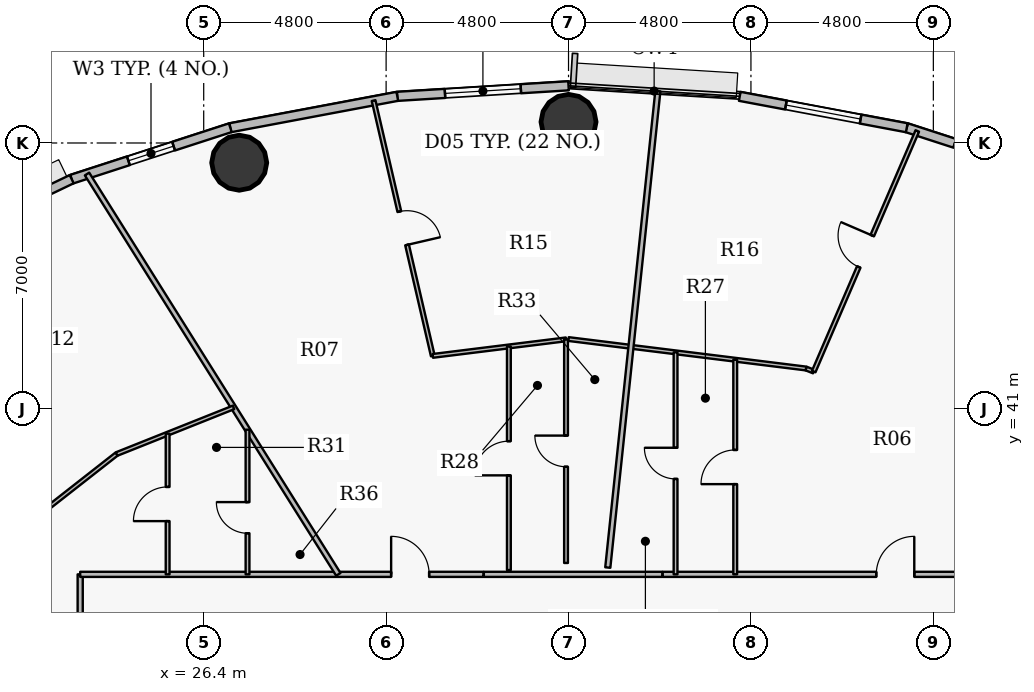
"""IFC4 building model, lengths in metres.
Left out: names, types, materials, properties, quantities, classifications, styles, units other than length and angle.
Written with IfcOpenShell. Run it as: python <this file> out.ifc"""

import sys

from ifc_helpers import new_model, si_unit, direction, frame, frame_2d, origin, origin_2d, place, context, subcontext, project, spatial, rectangle, hollow_circle, extrude, source, transform, mapped, element, fill, save


model = new_model("IFC4")
c1 = context("Model", 3, precision=1e-05, world=origin(), true_north=direction((0.0, 1.0)))
c2 = subcontext(c1, "Body", "Model", "MODEL_VIEW")
j1 = project(units=[si_unit("LENGTHUNIT", "METRE"), si_unit("PLANEANGLEUNIT", "RADIAN")], contexts=[c1])
p1 = place(None, origin())
s1 = spatial("IfcSite", under=j1, at=p1, CompositionType="ELEMENT")
p2 = place(p1, origin())
s2 = spatial("IfcBuilding", under=s1, at=p2, CompositionType="ELEMENT")
p3 = place(p2, frame((0.0, 0.0, 123.45)))
s3 = spatial("IfcBuildingStorey", under=s2, at=p3, CompositionType="ELEMENT", Elevation=123.45)
for number, where, z_axis, x_axis in (
    (1, (36.0, 48.555, 0.0), (0.0, 0.0, 1.0), (1.0, 0.0, 0.0)),
    (2, (27.334, 47.481, 0.0), (0.0, 0.0, 1.0), (1.0, 0.0, 0.0)),
):
    element("IfcColumn", number, at=place(p3, frame(where, z_axis=z_axis, x_axis=x_axis)), inside=s3, PredefinedType="COLUMN", context=c2, shape_type="SweptSolid", body=[
        extrude(hollow_circle(Radius=0.725, WallThickness=0.042, at=origin_2d()), origin(), (0.0, 0.0, 1.0), 3.75),
    ])
p4 = place(p3, frame((44.9, 48.401, 0.0), z_axis=(0.0, 0.0, 1.0), x_axis=(0.951211346073, -0.308540070495, 0.0)))
e3 = element("IfcWall", 3, at=p4, inside=s3, PredefinedType="SOLIDWALL", context=c2, shape_type="SweptSolid", body=[
    extrude(rectangle(XDim=4.388, YDim=0.24, at=frame_2d((2.194, 0.0))), origin(), (0.0, 0.0, 1.0), 3.5),
])
p5 = place(p4, frame((1.329, 0.0, 0.9)))
e4 = element("IfcOpeningElement", 4, at=p5, cuts=e3, PredefinedType="OPENING", context=c2, shape_type="SweptSolid", body=[
    extrude(rectangle(XDim=2.0, YDim=1.75, at=origin_2d()), frame((1.0, 0.13, 0.875), z_axis=(0.0, -1.0, 0.0), x_axis=(1.0, 0.0, 0.0)), (0.0, 0.0, 1.0), 0.26),
])
p6 = place(p3, frame((40.506, 49.227, 0.0), z_axis=(0.0, 0.0, 1.0), x_axis=(0.982789252177, -0.184730305596, 0.0)))
e5 = element("IfcWall", 5, at=p6, inside=s3, PredefinedType="SOLIDWALL", context=c2, shape_type="SweptSolid", body=[
    extrude(rectangle(XDim=4.471, YDim=0.24, at=frame_2d((2.235, 0.0))), origin(), (0.0, 0.0, 1.0), 3.5),
])
p7 = place(p6, frame((1.236, 0.0, 0.9)))
e6 = element("IfcOpeningElement", 6, at=p7, cuts=e5, PredefinedType="OPENING", context=c2, shape_type="SweptSolid", body=[
    extrude(rectangle(XDim=2.0, YDim=1.75, at=origin_2d()), frame((1.0, 0.13, 0.875), z_axis=(0.0, -1.0, 0.0), x_axis=(1.0, 0.0, 0.0)), (0.0, 0.0, 1.0), 0.26),
])
p8 = place(p3, frame((31.494, 49.227, 0.0), z_axis=(0.0, 0.0, 1.0), x_axis=(0.998107531589, 0.061492726276, 0.0)))
e7 = element("IfcWall", 7, at=p8, inside=s3, PredefinedType="SOLIDWALL", context=c2, shape_type="SweptSolid", body=[
    extrude(rectangle(XDim=4.514, YDim=0.24, at=frame_2d((2.257, 0.0))), origin(), (0.0, 0.0, 1.0), 3.5),
])
p9 = place(p8, frame((1.257, 0.0, 0.9)))
e8 = element("IfcOpeningElement", 8, at=p9, cuts=e7, PredefinedType="OPENING", context=c2, shape_type="SweptSolid", body=[
    extrude(rectangle(XDim=2.0, YDim=1.75, at=origin_2d()), frame((1.0, 0.13, 0.875), z_axis=(0.0, -1.0, 0.0), x_axis=(1.0, 0.0, 0.0)), (0.0, 0.0, 1.0), 0.26),
])
p10 = place(p3, frame((27.1, 48.401, 0.0), z_axis=(0.0, 0.0, 1.0), x_axis=(0.982789252177, 0.184730305596, 0.0)))
e9 = element("IfcWall", 9, at=p10, inside=s3, PredefinedType="SOLIDWALL", context=c2, shape_type="SweptSolid", body=[
    extrude(rectangle(XDim=4.471, YDim=0.24, at=frame_2d((2.235, 0.0))), origin(), (0.0, 0.0, 1.0), 3.5),
])
p11 = place(p3, frame((22.926, 47.047, 0.0), z_axis=(0.0, 0.0, 1.0), x_axis=(0.951211346073, 0.308540070495, 0.0)))
e10 = element("IfcWall", 10, at=p11, inside=s3, PredefinedType="SOLIDWALL", context=c2, shape_type="SweptSolid", body=[
    extrude(rectangle(XDim=4.388, YDim=0.24, at=frame_2d((2.194, 0.0))), origin(), (0.0, 0.0, 1.0), 3.5),
])
p12 = place(p11, frame((1.569, 0.0, 0.9)))
e11 = element("IfcOpeningElement", 11, at=p12, cuts=e10, PredefinedType="OPENING", context=c2, shape_type="SweptSolid", body=[
    extrude(rectangle(XDim=1.25, YDim=1.65, at=origin_2d()), frame((0.625, 0.13, 0.825), z_axis=(0.0, -1.0, 0.0), x_axis=(1.0, 0.0, 0.0)), (0.0, 0.0, 1.0), 0.26),
])
p13 = place(p3, frame((19.075, 45.199, 0.0), z_axis=(0.0, 0.0, 1.0), x_axis=(0.901589935876, 0.432591709962, 0.0)))
e12 = element("IfcWall", 12, at=p13, inside=s3, PredefinedType="SOLIDWALL", context=c2, shape_type="SweptSolid", body=[
    extrude(rectangle(XDim=4.272, YDim=0.24, at=frame_2d((2.136, 0.0))), origin(), (0.0, 0.0, 1.0), 3.5),
])
p14 = place(p13, frame((1.136, 0.0, 0.9)))
e13 = element("IfcOpeningElement", 13, at=p14, cuts=e12, PredefinedType="OPENING", context=c2, shape_type="SweptSolid", body=[
    extrude(rectangle(XDim=2.0, YDim=1.75, at=origin_2d()), frame((1.0, 0.13, 0.875), z_axis=(0.0, -1.0, 0.0), x_axis=(1.0, 0.0, 0.0)), (0.0, 0.0, 1.0), 0.26),
])
p15 = place(p3, frame((9.91, 36.375, 0.0), z_axis=(0.0, 0.0, 1.0), x_axis=(0.941089213164, -0.338158384292, 0.0)))
e14 = element("IfcWall", 14, at=p15, inside=s3, PredefinedType="PARTITIONING", context=c2, shape_type="SweptSolid", body=[
    extrude(rectangle(XDim=14.069, YDim=0.135, at=frame_2d((7.035, 0.0))), origin(), (0.0, 0.0, 1.0), 2.935),
])
p16 = place(p3, frame((22.064, 38.214, 0.0), z_axis=(0.0, 0.0, 1.0), x_axis=(0.787364158956, 0.616488184146, 0.0)))
e15 = element("IfcWall", 15, at=p16, inside=s3, PredefinedType="PARTITIONING", context=c2, shape_type="SweptSolid", body=[
    extrude(rectangle(XDim=2.597, YDim=0.1, at=frame_2d((1.299, 0.0))), origin(), (0.0, 0.0, 1.0), 3.5),
])
p17 = place(p3, frame((23.15, 17.35, 0.0), z_axis=(0.0, 0.0, 1.0), x_axis=(0.0, 1.0, 0.0)))
e16 = element("IfcWall", 16, at=p17, inside=s3, PredefinedType="PARTITIONING", context=c2, shape_type="SweptSolid", body=[
    extrude(rectangle(XDim=19.3, YDim=0.135, at=frame_2d((9.65, 0.0))), origin(), (0.0, 0.0, 1.0), 2.935),
])
p18 = place(p17, frame((16.264, 0.0, 0.0)))
e17 = element("IfcOpeningElement", 17, at=p18, cuts=e16, PredefinedType="OPENING", context=c2, shape_type="SweptSolid", body=[
    extrude(rectangle(XDim=1.0, YDim=2.15, at=origin_2d()), frame((0.5, 0.078, 1.075), z_axis=(0.0, -1.0, 0.0), x_axis=(1.0, 0.0, 0.0)), (0.0, 0.0, 1.0), 0.155),
])
p19 = place(p17, frame((7.426, 0.0, 0.0)))
e18 = element("IfcOpeningElement", 18, at=p19, cuts=e16, PredefinedType="OPENING", context=c2, shape_type="SweptSolid", body=[
    extrude(rectangle(XDim=1.0, YDim=2.15, at=origin_2d()), frame((0.5, 0.078, 1.075), z_axis=(0.0, -1.0, 0.0), x_axis=(1.0, 0.0, 0.0)), (0.0, 0.0, 1.0), 0.155),
])
p20 = place(p3, frame((23.15, 36.65, 0.0), z_axis=(0.0, 0.0, 1.0), x_axis=(1.0, 0.0, 0.0)))
e19 = element("IfcWall", 19, at=p20, inside=s3, PredefinedType="PARTITIONING", context=c2, shape_type="SweptSolid", body=[
    extrude(rectangle(XDim=10.612, YDim=0.135, at=frame_2d((5.306, 0.0))), origin(), (0.0, 0.0, 1.0), 2.935),
])
p21 = place(p20, frame((8.182, 0.0, 0.0)))
e20 = element("IfcOpeningElement", 20, at=p21, cuts=e19, PredefinedType="OPENING", context=c2, shape_type="SweptSolid", body=[
    extrude(rectangle(XDim=1.0, YDim=2.15, at=origin_2d()), frame((0.5, 0.078, 1.075), z_axis=(0.0, -1.0, 0.0), x_axis=(1.0, 0.0, 0.0)), (0.0, 0.0, 1.0), 0.155),
])
p22 = place(p3, frame((23.33, 47.184, 0.0), z_axis=(0.0, 0.0, 1.0), x_axis=(0.531660079213, -0.846957826678, 0.0)))
e21 = element("IfcWall", 21, at=p22, inside=s3, PredefinedType="PARTITIONING", context=c2, shape_type="SweptSolid", body=[
    extrude(rectangle(XDim=12.437, YDim=0.135, at=frame_2d((6.219, 0.0))), origin(), (0.0, 0.0, 1.0), 2.935),
])
p23 = place(p3, frame((24.109, 39.816, 0.0), z_axis=(0.0, 0.0, 1.0), x_axis=(0.928811896505, 0.370551563092, 0.0)))
e22 = element("IfcWall", 22, at=p23, inside=s3, PredefinedType="PARTITIONING", context=c2, shape_type="SweptSolid", body=[
    extrude(rectangle(XDim=3.312, YDim=0.1, at=frame_2d((1.656, 0.0))), origin(), (0.0, 0.0, 1.0), 3.5),
])
p24 = place(p3, frame((25.451, 36.65, 0.0), z_axis=(0.0, 0.0, 1.0), x_axis=(0.0, 1.0, 0.0)))
e23 = element("IfcWall", 23, at=p24, inside=s3, PredefinedType="PARTITIONING", context=c2, shape_type="SweptSolid", body=[
    extrude(rectangle(XDim=3.701, YDim=0.1, at=frame_2d((1.851, 0.0))), origin(), (0.0, 0.0, 1.0), 3.5),
])
p25 = place(p24, frame((1.4, 0.0, 0.0)))
e24 = element("IfcOpeningElement", 24, at=p25, cuts=e23, PredefinedType="OPENING", context=c2, shape_type="SweptSolid", body=[
    extrude(rectangle(XDim=0.9, YDim=2.1, at=origin_2d()), frame((0.45, 0.06, 1.05), z_axis=(0.0, -1.0, 0.0), x_axis=(1.0, 0.0, 0.0)), (0.0, 0.0, 1.0), 0.12),
])
p26 = place(p3, frame((27.553, 36.65, 0.0), z_axis=(0.0, 0.0, 1.0), x_axis=(0.0, 1.0, 0.0)))
e25 = element("IfcWall", 25, at=p26, inside=s3, PredefinedType="PARTITIONING", context=c2, shape_type="SweptSolid", body=[
    extrude(rectangle(XDim=3.806, YDim=0.1, at=frame_2d((1.903, 0.0))), origin(), (0.0, 0.0, 1.0), 3.5),
])
p27 = place(p26, frame((1.081, 0.0, 0.0)))
e26 = element("IfcOpeningElement", 26, at=p27, cuts=e25, PredefinedType="OPENING", context=c2, shape_type="SweptSolid", body=[
    extrude(rectangle(XDim=0.82, YDim=2.1, at=origin_2d()), frame((0.41, 0.06, 1.05), z_axis=(0.0, -1.0, 0.0), x_axis=(1.0, 0.0, 0.0)), (0.0, 0.0, 1.0), 0.12),
])
p28 = place(p3, frame((30.87, 49.115, 0.0), z_axis=(0.0, 0.0, 1.0), x_axis=(0.225963524246, -0.97413576349, 0.0)))
e27 = element("IfcWall", 27, at=p28, inside=s3, PredefinedType="PARTITIONING", context=c2, shape_type="SweptSolid", body=[
    extrude(rectangle(XDim=6.895, YDim=0.1, at=frame_2d((3.448, 0.0))), origin(), (0.0, 0.0, 1.0), 2.935),
])
p29 = place(p28, frame((2.998, 0.0, 0.0)))
e28 = element("IfcOpeningElement", 28, at=p29, cuts=e27, PredefinedType="OPENING", context=c2, shape_type="SweptSolid", body=[
    extrude(rectangle(XDim=0.9, YDim=2.1, at=origin_2d()), frame((0.45, 0.06, 1.05), z_axis=(0.0, -1.0, 0.0), x_axis=(1.0, 0.0, 0.0)), (0.0, 0.0, 1.0), 0.12),
])
p30 = place(p3, frame((32.428, 42.398, 0.0), z_axis=(0.0, 0.0, 1.0), x_axis=(0.992389102891, 0.123141660146, 0.0)))
e29 = element("IfcWall", 29, at=p30, inside=s3, PredefinedType="PARTITIONING", context=c2, shape_type="SweptSolid", body=[
    extrude(rectangle(XDim=3.533, YDim=0.1, at=frame_2d((1.767, 0.0))), origin(), (0.0, 0.0, 1.0), 2.935),
])
p31 = place(p3, frame((34.43, 36.762, 0.0), z_axis=(0.0, 0.0, 1.0), x_axis=(0.0, 1.0, 0.0)))
e30 = element("IfcWall", 30, at=p31, inside=s3, PredefinedType="PARTITIONING", context=c2, shape_type="SweptSolid", body=[
    extrude(rectangle(XDim=5.884, YDim=0.1, at=frame_2d((2.942, 0.0))), origin(), (0.0, 0.0, 1.0), 3.085),
])
p32 = place(p31, frame((2.492, 0.0, 0.0)))
e31 = element("IfcOpeningElement", 31, at=p32, cuts=e30, PredefinedType="OPENING", context=c2, shape_type="SweptSolid", body=[
    extrude(rectangle(XDim=0.9, YDim=2.1, at=origin_2d()), frame((0.45, 0.06, 1.05), z_axis=(0.0, -1.0, 0.0), x_axis=(1.0, 0.0, 0.0)), (0.0, 0.0, 1.0), 0.12),
])
p33 = place(p3, frame((35.935, 36.949, 0.0), z_axis=(0.0, 0.0, 1.0), x_axis=(0.0, 1.0, 0.0)))
e32 = element("IfcWall", 32, at=p33, inside=s3, PredefinedType="PARTITIONING", context=c2, shape_type="SweptSolid", body=[
    extrude(rectangle(XDim=5.884, YDim=0.1, at=frame_2d((2.942, 0.0))), origin(), (0.0, 0.0, 1.0), 2.935),
])
p34 = place(p33, frame((2.532, 0.0, 0.0)))
e33 = element("IfcOpeningElement", 33, at=p34, cuts=e32, PredefinedType="OPENING", context=c2, shape_type="SweptSolid", body=[
    extrude(rectangle(XDim=0.82, YDim=2.1, at=origin_2d()), frame((0.41, 0.06, 1.05), z_axis=(0.0, -1.0, 0.0), x_axis=(1.0, 0.0, 0.0)), (0.0, 0.0, 1.0), 0.12),
])
p35 = place(p3, frame((36.0, 42.841, 0.0), z_axis=(0.0, 0.0, 1.0), x_axis=(0.992395485088, -0.123090215599, 0.0)))
e34 = element("IfcWall", 34, at=p35, inside=s3, PredefinedType="PARTITIONING", context=c2, shape_type="SweptSolid", body=[
    extrude(rectangle(XDim=6.299, YDim=0.1, at=frame_2d((3.15, 0.0))), origin(), (0.0, 0.0, 1.0), 2.935),
])
p36 = place(p3, frame((37.033, 36.829, 0.0), z_axis=(0.0, 0.0, 1.0), x_axis=(0.104530526966, 0.994521678463, 0.0)))
e35 = element("IfcWall", 35, at=p36, inside=s3, PredefinedType="PARTITIONING", context=c2, shape_type="SweptSolid", body=[
    extrude(rectangle(XDim=12.605, YDim=0.135, at=frame_2d((6.303, 0.0))), origin(), (0.0, 0.0, 1.0), 2.935),
])
p37 = place(p3, frame((38.477, 36.65, 0.0), z_axis=(0.0, 0.0, 1.0), x_axis=(1.0, 0.0, 0.0)))
e36 = element("IfcWall", 36, at=p37, inside=s3, PredefinedType="PARTITIONING", context=c2, shape_type="SweptSolid", body=[
    extrude(rectangle(XDim=10.373, YDim=0.135, at=frame_2d((5.187, 0.0))), origin(), (0.0, 0.0, 1.0), 2.935),
])
p38 = place(p37, frame((5.621, 0.0, 0.0)))
e37 = element("IfcOpeningElement", 37, at=p38, cuts=e36, PredefinedType="OPENING", context=c2, shape_type="SweptSolid", body=[
    extrude(rectangle(XDim=1.0, YDim=2.15, at=origin_2d()), frame((0.5, 0.078, 1.075), z_axis=(0.0, -1.0, 0.0), x_axis=(1.0, 0.0, 0.0)), (0.0, 0.0, 1.0), 0.155),
])
p39 = place(p3, frame((38.817, 36.65, 0.0), z_axis=(0.0, 0.0, 1.0), x_axis=(0.0, 1.0, 0.0)))
e38 = element("IfcWall", 38, at=p39, inside=s3, PredefinedType="PARTITIONING", context=c2, shape_type="SweptSolid", body=[
    extrude(rectangle(XDim=5.842, YDim=0.1, at=frame_2d((2.921, 0.0))), origin(), (0.0, 0.0, 1.0), 3.185),
])
p40 = place(p39, frame((2.511, 0.0, 0.0)))
e39 = element("IfcOpeningElement", 39, at=p40, cuts=e38, PredefinedType="OPENING", context=c2, shape_type="SweptSolid", body=[
    extrude(rectangle(XDim=0.82, YDim=2.1, at=origin_2d()), frame((0.41, 0.06, 1.05), z_axis=(0.0, -1.0, 0.0), x_axis=(1.0, 0.0, 0.0)), (0.0, 0.0, 1.0), 0.12),
])
p41 = place(p3, frame((40.386, 36.65, 0.0), z_axis=(0.0, 0.0, 1.0), x_axis=(0.0, 1.0, 0.0)))
e40 = element("IfcWall", 40, at=p41, inside=s3, PredefinedType="PARTITIONING", context=c2, shape_type="SweptSolid", body=[
    extrude(rectangle(XDim=5.647, YDim=0.1, at=frame_2d((2.824, 0.0))), origin(), (0.0, 0.0, 1.0), 3.185),
])
p42 = place(p41, frame((2.374, 0.0, 0.0)))
e41 = element("IfcOpeningElement", 41, at=p42, cuts=e40, PredefinedType="OPENING", context=c2, shape_type="SweptSolid", body=[
    extrude(rectangle(XDim=0.9, YDim=2.1, at=origin_2d()), frame((0.45, 0.06, 1.05), z_axis=(0.0, -1.0, 0.0), x_axis=(1.0, 0.0, 0.0)), (0.0, 0.0, 1.0), 0.12),
])
p43 = place(p3, frame((42.251, 42.066, 0.0), z_axis=(0.0, 0.0, 1.0), x_axis=(0.928632622675, -0.371000609303, 0.0)))
e42 = element("IfcWall", 42, at=p43, inside=s3, PredefinedType="PARTITIONING", context=c2, shape_type="SweptSolid", body=[
    extrude(rectangle(XDim=0.216, YDim=0.1, at=frame_2d((0.108, 0.0))), origin(), (0.0, 0.0, 1.0), 3.5),
])
p44 = place(p3, frame((42.452, 41.986, 0.0), z_axis=(0.0, 0.0, 1.0), x_axis=(0.395466235438, 0.918480515105, 0.0)))
e43 = element("IfcWall", 43, at=p44, inside=s3, PredefinedType="PARTITIONING", context=c2, shape_type="SweptSolid", body=[
    extrude(rectangle(XDim=6.893, YDim=0.1, at=frame_2d((3.446, 0.0))), origin(), (0.0, 0.0, 1.0), 2.935),
])
p45 = place(p44, frame((2.996, 0.0, 0.0)))
e44 = element("IfcOpeningElement", 44, at=p45, cuts=e43, PredefinedType="OPENING", context=c2, shape_type="SweptSolid", body=[
    extrude(rectangle(XDim=0.9, YDim=2.1, at=origin_2d()), frame((0.45, 0.06, 1.05), z_axis=(0.0, -1.0, 0.0), x_axis=(1.0, 0.0, 0.0)), (0.0, 0.0, 1.0), 0.12),
])
p46 = place(p3, frame((33.772, 36.65, 0.0), z_axis=(0.0, 0.0, 1.0), x_axis=(1.0, 0.0, 0.0)))
e45 = element("IfcWall", 45, at=p46, inside=s3, PredefinedType="PARTITIONING", context=c2, shape_type="SweptSolid", body=[
    extrude(rectangle(XDim=4.695, YDim=0.135, at=frame_2d((2.348, 0.0))), origin(), (0.0, 0.0, 1.0), 2.935),
])
m1 = source(origin(), c2, "Body", "SweptSolid", [
    extrude(rectangle(XDim=2.0, YDim=1.75, at=origin_2d()), frame((1.0, 0.03, 0.875), z_axis=(0.0, -1.0, 0.0), x_axis=(1.0, 0.0, 0.0)), (0.0, 0.0, 1.0), 0.06),
])
p47 = place(p7, origin())
e46 = element("IfcWindow", 46, at=p47, inside=s3, PartitioningType="DOUBLE_PANEL_VERTICAL", PredefinedType="WINDOW", context=c2, shape_type="MappedRepresentation", body=[
    mapped(m1, transform((0.0, 0.0, 0.0), x_axis=(1.0, 0.0, 0.0), y_axis=(0.0, 1.0, 0.0), z_axis=(0.0, 0.0, 1.0), scale=1.0)),
])
fill(e6, e46)
p48 = place(p9, origin())
e47 = element("IfcWindow", 47, at=p48, inside=s3, PartitioningType="DOUBLE_PANEL_VERTICAL", PredefinedType="WINDOW", context=c2, shape_type="MappedRepresentation", body=[
    mapped(m1, transform((0.0, 0.0, 0.0), x_axis=(1.0, 0.0, 0.0), y_axis=(0.0, 1.0, 0.0), z_axis=(0.0, 0.0, 1.0), scale=1.0)),
])
fill(e8, e47)
m2 = source(origin(), c2, "Body", "SweptSolid", [
    extrude(rectangle(XDim=1.25, YDim=1.65, at=origin_2d()), frame((0.625, 0.03, 0.825), z_axis=(0.0, -1.0, 0.0), x_axis=(1.0, 0.0, 0.0)), (0.0, 0.0, 1.0), 0.06),
])
p49 = place(p12, origin())
e48 = element("IfcWindow", 48, at=p49, inside=s3, PartitioningType="SINGLE_PANEL", PredefinedType="WINDOW", context=c2, shape_type="MappedRepresentation", body=[
    mapped(m2, transform((0.0, 0.0, 0.0), x_axis=(1.0, 0.0, 0.0), y_axis=(0.0, 1.0, 0.0), z_axis=(0.0, 0.0, 1.0), scale=1.0)),
])
fill(e11, e48)
m3 = source(origin(), c2, "Body", "SweptSolid", [
    extrude(rectangle(XDim=1.0, YDim=2.15, at=origin_2d()), frame((0.5, 0.025, 1.075), z_axis=(0.0, -1.0, 0.0), x_axis=(1.0, 0.0, 0.0)), (0.0, 0.0, 1.0), 0.05),
])
p50 = place(p21, origin())
e49 = element("IfcDoor", 49, at=p50, inside=s3, OperationType="SINGLE_SWING_LEFT", PredefinedType="DOOR", context=c2, shape_type="MappedRepresentation", body=[
    mapped(m3, transform((0.0, 0.0, 0.0), x_axis=(1.0, 0.0, 0.0), y_axis=(0.0, 1.0, 0.0), z_axis=(0.0, 0.0, 1.0), scale=1.0)),
])
fill(e20, e49)
m4 = source(origin(), c2, "Body", "SweptSolid", [
    extrude(rectangle(XDim=0.9, YDim=2.1, at=origin_2d()), frame((0.45, 0.025, 1.05), z_axis=(0.0, -1.0, 0.0), x_axis=(1.0, 0.0, 0.0)), (0.0, 0.0, 1.0), 0.05),
])
p51 = place(p29, origin())
e50 = element("IfcDoor", 50, at=p51, inside=s3, OperationType="SINGLE_SWING_RIGHT", PredefinedType="DOOR", context=c2, shape_type="MappedRepresentation", body=[
    mapped(m4, transform((0.0, 0.0, 0.0), x_axis=(1.0, 0.0, 0.0), y_axis=(0.0, 1.0, 0.0), z_axis=(0.0, 0.0, 1.0), scale=1.0)),
])
fill(e28, e50)
p52 = place(p32, origin())
e51 = element("IfcDoor", 51, at=p52, inside=s3, OperationType="SINGLE_SWING_LEFT", PredefinedType="DOOR", context=c2, shape_type="MappedRepresentation", body=[
    mapped(m4, transform((0.0, 0.0, 0.0), x_axis=(1.0, 0.0, 0.0), y_axis=(0.0, 1.0, 0.0), z_axis=(0.0, 0.0, 1.0), scale=1.0)),
])
fill(e31, e51)
m5 = source(origin(), c2, "Body", "SweptSolid", [
    extrude(rectangle(XDim=0.82, YDim=2.1, at=origin_2d()), frame((0.41, 0.025, 1.05), z_axis=(0.0, -1.0, 0.0), x_axis=(1.0, 0.0, 0.0)), (0.0, 0.0, 1.0), 0.05),
])
p53 = place(p34, origin())
e52 = element("IfcDoor", 52, at=p53, inside=s3, OperationType="SINGLE_SWING_RIGHT", PredefinedType="DOOR", context=c2, shape_type="MappedRepresentation", body=[
    mapped(m5, transform((0.0, 0.0, 0.0), x_axis=(1.0, 0.0, 0.0), y_axis=(0.0, 1.0, 0.0), z_axis=(0.0, 0.0, 1.0), scale=1.0)),
])
fill(e33, e52)
p54 = place(p25, origin())
e53 = element("IfcDoor", 53, at=p54, inside=s3, OperationType="SINGLE_SWING_LEFT", PredefinedType="DOOR", context=c2, shape_type="MappedRepresentation", body=[
    mapped(m4, transform((0.0, 0.0, 0.0), x_axis=(1.0, 0.0, 0.0), y_axis=(0.0, 1.0, 0.0), z_axis=(0.0, 0.0, 1.0), scale=1.0)),
])
fill(e24, e53)
p55 = place(p27, origin())
e54 = element("IfcDoor", 54, at=p55, inside=s3, OperationType="SINGLE_SWING_RIGHT", PredefinedType="DOOR", context=c2, shape_type="MappedRepresentation", body=[
    mapped(m5, transform((0.0, 0.0, 0.0), x_axis=(1.0, 0.0, 0.0), y_axis=(0.0, 1.0, 0.0), z_axis=(0.0, 0.0, 1.0), scale=1.0)),
])
fill(e26, e54)
p56 = place(p38, origin())
e55 = element("IfcDoor", 55, at=p56, inside=s3, OperationType="SINGLE_SWING_RIGHT", PredefinedType="DOOR", context=c2, shape_type="MappedRepresentation", body=[
    mapped(m3, transform((0.0, 0.0, 0.0), x_axis=(1.0, 0.0, 0.0), y_axis=(0.0, 1.0, 0.0), z_axis=(0.0, 0.0, 1.0), scale=1.0)),
])
fill(e37, e55)
p57 = place(p45, origin())
e56 = element("IfcDoor", 56, at=p57, inside=s3, OperationType="SINGLE_SWING_RIGHT", PredefinedType="DOOR", context=c2, shape_type="MappedRepresentation", body=[
    mapped(m4, transform((0.0, 0.0, 0.0), x_axis=(1.0, 0.0, 0.0), y_axis=(0.0, 1.0, 0.0), z_axis=(0.0, 0.0, 1.0), scale=1.0)),
])
fill(e44, e56)
p58 = place(p42, origin())
e57 = element("IfcDoor", 57, at=p58, inside=s3, OperationType="SINGLE_SWING_LEFT", PredefinedType="DOOR", context=c2, shape_type="MappedRepresentation", body=[
    mapped(m4, transform((0.0, 0.0, 0.0), x_axis=(1.0, 0.0, 0.0), y_axis=(0.0, 1.0, 0.0), z_axis=(0.0, 0.0, 1.0), scale=1.0)),
])
fill(e41, e57)
p59 = place(p40, origin())
e58 = element("IfcDoor", 58, at=p59, inside=s3, OperationType="SINGLE_SWING_RIGHT", PredefinedType="DOOR", context=c2, shape_type="MappedRepresentation", body=[
    mapped(m5, transform((0.0, 0.0, 0.0), x_axis=(1.0, 0.0, 0.0), y_axis=(0.0, 1.0, 0.0), z_axis=(0.0, 0.0, 1.0), scale=1.0)),
])
fill(e39, e58)
save(model, sys.argv[1])
